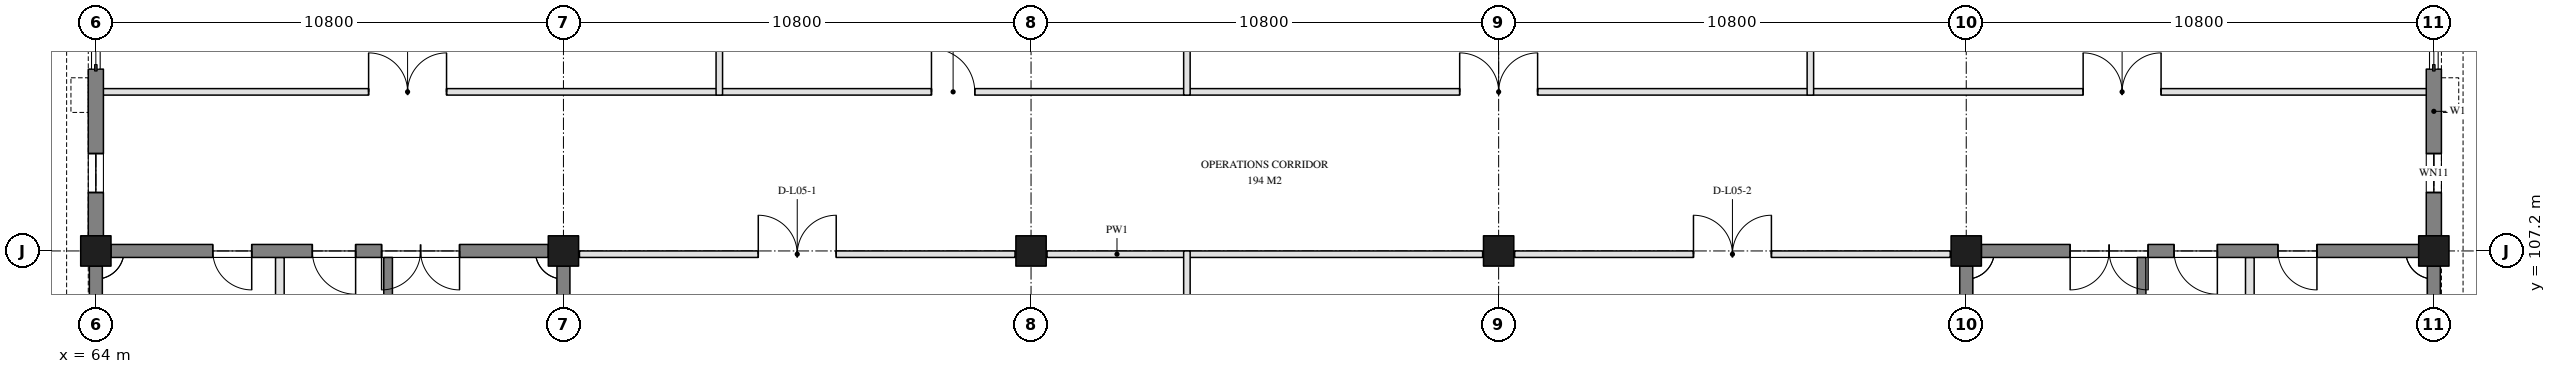
"""IFC4 building model, lengths in metres.
Left out: names, types, materials, properties, quantities, classifications, styles, units other than length and angle.
Written with IfcOpenShell. Run it as: python <this file> out.ifc"""

import sys

from ifc_helpers import new_model, si_unit, direction, frame, frame_2d, origin, origin_2d, place, context, subcontext, project, spatial, rectangle, extrude, element, fill, save


model = new_model("IFC4")
c1 = context("Model", 3, precision=1e-05, world=origin(), true_north=direction((0.0, 1.0)))
c2 = subcontext(c1, "Body", "Model", "MODEL_VIEW")
j1 = project(units=[si_unit("LENGTHUNIT", "METRE"), si_unit("PLANEANGLEUNIT", "RADIAN")], contexts=[c1])
p1 = place(None, origin())
s1 = spatial("IfcSite", under=j1, at=p1, CompositionType="ELEMENT")
p2 = place(p1, origin())
s2 = spatial("IfcBuilding", under=s1, at=p2, CompositionType="ELEMENT")
p3 = place(p2, frame((0.0, 0.0, 20.4)))
s3 = spatial("IfcBuildingStorey", under=s2, at=p3, CompositionType="ELEMENT", Elevation=20.4)
for number, where, z_axis, x_axis in (
    (1, (64.0, 107.2, 0.0), (0.0, 0.0, 1.0), (1.0, 0.0, 0.0)),
    (2, (74.8, 107.2, 0.0), (0.0, 0.0, 1.0), (1.0, 0.0, 0.0)),
    (3, (85.6, 107.2, 0.0), (0.0, 0.0, 1.0), (1.0, 0.0, 0.0)),
    (4, (96.4, 107.2, 0.0), (0.0, 0.0, 1.0), (1.0, 0.0, 0.0)),
    (5, (107.2, 107.2, 0.0), (0.0, 0.0, 1.0), (1.0, 0.0, 0.0)),
    (6, (118.0, 107.2, 0.0), (0.0, 0.0, 1.0), (1.0, 0.0, 0.0)),
):
    element("IfcColumn", number, at=place(p3, frame(where, z_axis=z_axis, x_axis=x_axis)), inside=s3, PredefinedType="COLUMN", context=c2, shape_type="SweptSolid", body=[
        extrude(rectangle(XDim=0.7, YDim=0.7, at=origin_2d()), origin(), (0.0, 0.0, 1.0), 3.9),
    ])
p4 = place(p3, frame((74.8, 96.75, 0.0), z_axis=(0.0, 0.0, 1.0), x_axis=(0.0, 1.0, 0.0)))
e7 = element("IfcWall", 7, at=p4, inside=s3, PredefinedType="SOLIDWALL", context=c2, shape_type="SweptSolid", body=[
    extrude(rectangle(XDim=10.1, YDim=0.3, at=frame_2d((5.05, 0.0))), origin(), (0.0, 0.0, 1.0), 3.9),
])
p5 = place(p3, frame((74.45, 107.2, 0.0), z_axis=(0.0, 0.0, 1.0), x_axis=(-1.0, 0.0, 0.0)))
e8 = element("IfcWall", 8, at=p5, inside=s3, PredefinedType="SOLIDWALL", context=c2, shape_type="SweptSolid", body=[
    extrude(rectangle(XDim=10.1, YDim=0.3, at=frame_2d((5.05, 0.0))), origin(), (0.0, 0.0, 1.0), 3.9),
])
p6 = place(p5, frame((2.05, 0.0, 0.0)))
e9 = element("IfcOpeningElement", 9, at=p6, cuts=e8, PredefinedType="OPENING", context=c2, shape_type="SweptSolid", body=[
    extrude(rectangle(XDim=1.8, YDim=2.1, at=frame_2d((0.9, 1.05))), frame((0.0, 0.16, 0.0), z_axis=(0.0, -1.0, 0.0), x_axis=(1.0, 0.0, 0.0)), (0.0, 0.0, 1.0), 0.32),
])
p7 = place(p5, frame((4.45, 0.0, 0.0)))
e10 = element("IfcOpeningElement", 10, at=p7, cuts=e8, PredefinedType="OPENING", context=c2, shape_type="SweptSolid", body=[
    extrude(rectangle(XDim=1.0, YDim=2.1, at=frame_2d((0.5, 1.05))), frame((0.0, 0.16, 0.0), z_axis=(0.0, -1.0, 0.0), x_axis=(1.0, 0.0, 0.0)), (0.0, 0.0, 1.0), 0.32),
])
p8 = place(p5, frame((6.85, 0.0, 0.0)))
e11 = element("IfcOpeningElement", 11, at=p8, cuts=e8, PredefinedType="OPENING", context=c2, shape_type="SweptSolid", body=[
    extrude(rectangle(XDim=0.9, YDim=2.1, at=frame_2d((0.45, 1.05))), frame((0.0, 0.16, 0.0), z_axis=(0.0, -1.0, 0.0), x_axis=(1.0, 0.0, 0.0)), (0.0, 0.0, 1.0), 0.32),
])
for number, where, z_axis, x_axis in (
    (12, (64.0, 106.85, 0.0), (0.0, 0.0, 1.0), (0.0, -1.0, 0.0)),
    (13, (118.0, 96.75, 0.0), (0.0, 0.0, 1.0), (0.0, 1.0, 0.0)),
):
    element("IfcWall", number, at=place(p3, frame(where, z_axis=z_axis, x_axis=x_axis)), inside=s3, PredefinedType="SOLIDWALL", context=c2, shape_type="SweptSolid", body=[
        extrude(rectangle(XDim=10.1, YDim=0.3, at=frame_2d((5.05, 0.0))), origin(), (0.0, 0.0, 1.0), 3.9),
    ])
p9 = place(p3, frame((117.65, 107.2, 0.0), z_axis=(0.0, 0.0, 1.0), x_axis=(-1.0, 0.0, 0.0)))
e14 = element("IfcWall", 14, at=p9, inside=s3, PredefinedType="SOLIDWALL", context=c2, shape_type="SweptSolid", body=[
    extrude(rectangle(XDim=10.1, YDim=0.3, at=frame_2d((5.05, 0.0))), origin(), (0.0, 0.0, 1.0), 3.9),
])
p10 = place(p9, frame((6.25, 0.0, 0.0)))
e15 = element("IfcOpeningElement", 15, at=p10, cuts=e14, PredefinedType="OPENING", context=c2, shape_type="SweptSolid", body=[
    extrude(rectangle(XDim=1.8, YDim=2.1, at=frame_2d((0.9, 1.05))), frame((0.0, 0.16, 0.0), z_axis=(0.0, -1.0, 0.0), x_axis=(1.0, 0.0, 0.0)), (0.0, 0.0, 1.0), 0.32),
])
p11 = place(p9, frame((4.65, 0.0, 0.0)))
e16 = element("IfcOpeningElement", 16, at=p11, cuts=e14, PredefinedType="OPENING", context=c2, shape_type="SweptSolid", body=[
    extrude(rectangle(XDim=1.0, YDim=2.1, at=frame_2d((0.5, 1.05))), frame((0.0, 0.16, 0.0), z_axis=(0.0, -1.0, 0.0), x_axis=(1.0, 0.0, 0.0)), (0.0, 0.0, 1.0), 0.32),
])
p12 = place(p9, frame((2.35, 0.0, 0.0)))
e17 = element("IfcOpeningElement", 17, at=p12, cuts=e14, PredefinedType="OPENING", context=c2, shape_type="SweptSolid", body=[
    extrude(rectangle(XDim=0.9, YDim=2.1, at=frame_2d((0.45, 1.05))), frame((0.0, 0.16, 0.0), z_axis=(0.0, -1.0, 0.0), x_axis=(1.0, 0.0, 0.0)), (0.0, 0.0, 1.0), 0.32),
])
p13 = place(p3, frame((107.2, 106.85, 0.0), z_axis=(0.0, 0.0, 1.0), x_axis=(0.0, -1.0, 0.0)))
e18 = element("IfcWall", 18, at=p13, inside=s3, PredefinedType="SOLIDWALL", context=c2, shape_type="SweptSolid", body=[
    extrude(rectangle(XDim=10.1, YDim=0.3, at=frame_2d((5.05, 0.0))), origin(), (0.0, 0.0, 1.0), 3.9),
])
p14 = place(p3, frame((64.0, 107.55, 0.0), z_axis=(0.0, 0.0, 1.0), x_axis=(0.0, 1.0, 0.0)))
e19 = element("IfcWall", 19, at=p14, inside=s3, PredefinedType="SOLIDWALL", context=c2, shape_type="SweptSolid", body=[
    extrude(rectangle(XDim=3.85, YDim=0.35, at=frame_2d((1.925, 0.0))), origin(), (0.0, 0.0, 1.0), 2.8),
])
p15 = place(p14, frame((1.0, 0.0, 0.9)))
e20 = element("IfcOpeningElement", 20, at=p15, cuts=e19, PredefinedType="OPENING", context=c2, shape_type="SweptSolid", body=[
    extrude(rectangle(XDim=0.9, YDim=1.8, at=frame_2d((0.45, 0.9))), frame((0.0, 0.185, 0.0), z_axis=(0.0, -1.0, 0.0), x_axis=(1.0, 0.0, 0.0)), (0.0, 0.0, 1.0), 0.37),
])
p16 = place(p3, frame((118.0, 107.55, 0.0), z_axis=(0.0, 0.0, 1.0), x_axis=(0.0, 1.0, 0.0)))
e21 = element("IfcWall", 21, at=p16, inside=s3, PredefinedType="SOLIDWALL", context=c2, shape_type="SweptSolid", body=[
    extrude(rectangle(XDim=3.85, YDim=0.35, at=frame_2d((1.925, 0.0))), origin(), (0.0, 0.0, 1.0), 2.8),
])
p17 = place(p16, frame((1.0, 0.0, 0.9)))
e22 = element("IfcOpeningElement", 22, at=p17, cuts=e21, PredefinedType="OPENING", context=c2, shape_type="SweptSolid", body=[
    extrude(rectangle(XDim=0.9, YDim=1.8, at=frame_2d((0.45, 0.9))), frame((0.0, 0.185, 0.0), z_axis=(0.0, -1.0, 0.0), x_axis=(1.0, 0.0, 0.0)), (0.0, 0.0, 1.0), 0.37),
])
p18 = place(p3, frame((70.75, 104.8, 0.0), z_axis=(0.0, 0.0, 1.0), x_axis=(0.0, 1.0, 0.0)))
e23 = element("IfcWall", 23, at=p18, inside=s3, PredefinedType="SOLIDWALL", context=c2, shape_type="SweptSolid", body=[
    extrude(rectangle(XDim=2.25, YDim=0.2, at=frame_2d((1.125, 0.0))), origin(), (0.0, 0.0, 1.0), 3.6),
])
p19 = place(p3, frame((68.25, 104.8, 0.0), z_axis=(0.0, 0.0, 1.0), x_axis=(0.0, 1.0, 0.0)))
e24 = element("IfcWall", 24, at=p19, inside=s3, PredefinedType="PARTITIONING", context=c2, shape_type="SweptSolid", body=[
    extrude(rectangle(XDim=2.25, YDim=0.2, at=frame_2d((1.125, 0.0))), origin(), (0.0, 0.0, 1.0), 3.6),
])
p20 = place(p3, frame((111.25, 107.05, 0.0), z_axis=(0.0, 0.0, 1.0), x_axis=(0.0, -1.0, 0.0)))
e25 = element("IfcWall", 25, at=p20, inside=s3, PredefinedType="SOLIDWALL", context=c2, shape_type="SweptSolid", body=[
    extrude(rectangle(XDim=2.25, YDim=0.2, at=frame_2d((1.125, 0.0))), origin(), (0.0, 0.0, 1.0), 3.6),
])
p21 = place(p3, frame((113.75, 107.05, 0.0), z_axis=(0.0, 0.0, 1.0), x_axis=(0.0, -1.0, 0.0)))
e26 = element("IfcWall", 26, at=p21, inside=s3, PredefinedType="PARTITIONING", context=c2, shape_type="SweptSolid", body=[
    extrude(rectangle(XDim=2.25, YDim=0.2, at=frame_2d((1.125, 0.0))), origin(), (0.0, 0.0, 1.0), 3.6),
])
p22 = place(p3, frame((85.97, 107.125, 0.0), z_axis=(0.0, 0.0, 1.0), x_axis=(1.0, 0.0, 0.0)))
e27 = element("IfcWall", 27, at=p22, inside=s3, PredefinedType="PARTITIONING", context=c2, shape_type="SweptSolid", body=[
    extrude(rectangle(XDim=3.23, YDim=0.15, at=frame_2d((1.615, 0.0))), origin(), (0.0, 0.0, 1.0), 2.8),
])
p23 = place(p3, frame((75.17, 107.125, 0.0), z_axis=(0.0, 0.0, 1.0), x_axis=(1.0, 0.0, 0.0)))
e28 = element("IfcWall", 28, at=p23, inside=s3, PredefinedType="PARTITIONING", context=c2, shape_type="SweptSolid", body=[
    extrude(rectangle(XDim=10.06, YDim=0.15, at=frame_2d((5.03, 0.0))), origin(), (0.0, 0.0, 1.0), 2.8),
])
p24 = place(p23, frame((4.13, 0.0, 0.0)))
e29 = element("IfcOpeningElement", 29, at=p24, cuts=e28, PredefinedType="OPENING", context=c2, shape_type="SweptSolid", body=[
    extrude(rectangle(XDim=1.8, YDim=2.1, at=frame_2d((0.9, 1.05))), frame((0.0, 0.085, 0.0), z_axis=(0.0, -1.0, 0.0), x_axis=(1.0, 0.0, 0.0)), (0.0, 0.0, 1.0), 0.17),
])
p25 = place(p3, frame((96.77, 107.125, 0.0), z_axis=(0.0, 0.0, 1.0), x_axis=(1.0, 0.0, 0.0)))
e30 = element("IfcWall", 30, at=p25, inside=s3, PredefinedType="PARTITIONING", context=c2, shape_type="SweptSolid", body=[
    extrude(rectangle(XDim=10.06, YDim=0.15, at=frame_2d((5.03, 0.0))), origin(), (0.0, 0.0, 1.0), 2.8),
])
p26 = place(p25, frame((4.13, 0.0, 0.0)))
e31 = element("IfcOpeningElement", 31, at=p26, cuts=e30, PredefinedType="OPENING", context=c2, shape_type="SweptSolid", body=[
    extrude(rectangle(XDim=1.8, YDim=2.1, at=frame_2d((0.9, 1.05))), frame((0.0, 0.085, 0.0), z_axis=(0.0, -1.0, 0.0), x_axis=(1.0, 0.0, 0.0)), (0.0, 0.0, 1.0), 0.17),
])
p27 = place(p3, frame((89.2, 107.125, 0.0), z_axis=(0.0, 0.0, 1.0), x_axis=(1.0, 0.0, 0.0)))
e32 = element("IfcWall", 32, at=p27, inside=s3, PredefinedType="PARTITIONING", context=c2, shape_type="SweptSolid", body=[
    extrude(rectangle(XDim=6.83, YDim=0.15, at=frame_2d((3.415, 0.0))), origin(), (0.0, 0.0, 1.0), 2.8),
])
p28 = place(p3, frame((64.0, 110.875, 0.0), z_axis=(0.0, 0.0, 1.0), x_axis=(1.0, 0.0, 0.0)))
e33 = element("IfcWall", 33, at=p28, inside=s3, PredefinedType="PARTITIONING", context=c2, shape_type="SweptSolid", body=[
    extrude(rectangle(XDim=14.4, YDim=0.15, at=frame_2d((7.2, 0.0))), origin(), (0.0, 0.0, 1.0), 2.8),
])
p29 = place(p28, frame((6.3, 0.0, 0.0)))
e34 = element("IfcOpeningElement", 34, at=p29, cuts=e33, PredefinedType="OPENING", context=c2, shape_type="SweptSolid", body=[
    extrude(rectangle(XDim=1.8, YDim=2.1, at=frame_2d((0.9, 1.05))), frame((0.0, 0.085, 0.0), z_axis=(0.0, -1.0, 0.0), x_axis=(1.0, 0.0, 0.0)), (0.0, 0.0, 1.0), 0.17),
])
p30 = place(p3, frame((78.4, 110.875, 0.0), z_axis=(0.0, 0.0, 1.0), x_axis=(1.0, 0.0, 0.0)))
e35 = element("IfcWall", 35, at=p30, inside=s3, PredefinedType="PARTITIONING", context=c2, shape_type="SweptSolid", body=[
    extrude(rectangle(XDim=10.8, YDim=0.15, at=frame_2d((5.4, 0.0))), origin(), (0.0, 0.0, 1.0), 2.8),
])
p31 = place(p30, frame((4.9, 0.0, 0.0)))
e36 = element("IfcOpeningElement", 36, at=p31, cuts=e35, PredefinedType="OPENING", context=c2, shape_type="SweptSolid", body=[
    extrude(rectangle(XDim=1.0, YDim=2.1, at=frame_2d((0.5, 1.05))), frame((0.0, 0.085, 0.0), z_axis=(0.0, -1.0, 0.0), x_axis=(1.0, 0.0, 0.0)), (0.0, 0.0, 1.0), 0.17),
])
p32 = place(p3, frame((89.2, 110.875, 0.0), z_axis=(0.0, 0.0, 1.0), x_axis=(1.0, 0.0, 0.0)))
e37 = element("IfcWall", 37, at=p32, inside=s3, PredefinedType="PARTITIONING", context=c2, shape_type="SweptSolid", body=[
    extrude(rectangle(XDim=14.4, YDim=0.15, at=frame_2d((7.2, 0.0))), origin(), (0.0, 0.0, 1.0), 2.8),
])
p33 = place(p32, frame((6.3, 0.0, 0.0)))
e38 = element("IfcOpeningElement", 38, at=p33, cuts=e37, PredefinedType="OPENING", context=c2, shape_type="SweptSolid", body=[
    extrude(rectangle(XDim=1.8, YDim=2.1, at=frame_2d((0.9, 1.05))), frame((0.0, 0.085, 0.0), z_axis=(0.0, -1.0, 0.0), x_axis=(1.0, 0.0, 0.0)), (0.0, 0.0, 1.0), 0.17),
])
p34 = place(p3, frame((103.6, 110.875, 0.0), z_axis=(0.0, 0.0, 1.0), x_axis=(1.0, 0.0, 0.0)))
e39 = element("IfcWall", 39, at=p34, inside=s3, PredefinedType="PARTITIONING", context=c2, shape_type="SweptSolid", body=[
    extrude(rectangle(XDim=14.4, YDim=0.15, at=frame_2d((7.2, 0.0))), origin(), (0.0, 0.0, 1.0), 2.8),
])
p35 = place(p34, frame((6.3, 0.0, 0.0)))
e40 = element("IfcOpeningElement", 40, at=p35, cuts=e39, PredefinedType="OPENING", context=c2, shape_type="SweptSolid", body=[
    extrude(rectangle(XDim=1.8, YDim=2.1, at=frame_2d((0.9, 1.05))), frame((0.0, 0.085, 0.0), z_axis=(0.0, -1.0, 0.0), x_axis=(1.0, 0.0, 0.0)), (0.0, 0.0, 1.0), 0.17),
])
p36 = place(p3, frame((89.2, 96.4, 0.0), z_axis=(0.0, 0.0, 1.0), x_axis=(0.0, 1.0, 0.0)))
e41 = element("IfcWall", 41, at=p36, inside=s3, PredefinedType="PARTITIONING", context=c2, shape_type="SweptSolid", body=[
    extrude(rectangle(XDim=10.8, YDim=0.15, at=frame_2d((5.4, 0.0))), origin(), (0.0, 0.0, 1.0), 2.8),
])
for number, where, z_axis, x_axis in (
    (42, (78.4, 110.8, 0.0), (0.0, 0.0, 1.0), (0.0, 1.0, 0.0)),
    (43, (89.2, 110.8, 0.0), (0.0, 0.0, 1.0), (0.0, 1.0, 0.0)),
    (44, (103.6, 110.8, 0.0), (0.0, 0.0, 1.0), (0.0, 1.0, 0.0)),
):
    element("IfcWall", number, at=place(p3, frame(where, z_axis=z_axis, x_axis=x_axis)), inside=s3, PredefinedType="PARTITIONING", context=c2, shape_type="SweptSolid", body=[
        extrude(rectangle(XDim=7.2, YDim=0.15, at=frame_2d((3.6, 0.0))), origin(), (0.0, 0.0, 1.0), 2.8),
    ])
p37 = place(p15, origin())
e45 = element("IfcWindow", 45, at=p37, inside=s3, PartitioningType="SINGLE_PANEL", PredefinedType="WINDOW", context=c2, shape_type="SweptSolid", body=[
    extrude(rectangle(XDim=0.9, YDim=1.8, at=frame_2d((0.45, 0.9))), frame((0.0, 0.03, 0.0), z_axis=(0.0, -1.0, 0.0), x_axis=(1.0, 0.0, 0.0)), (0.0, 0.0, 1.0), 0.06),
])
fill(e20, e45)
p38 = place(p17, origin())
e46 = element("IfcWindow", 46, at=p38, inside=s3, PartitioningType="SINGLE_PANEL", PredefinedType="WINDOW", context=c2, shape_type="SweptSolid", body=[
    extrude(rectangle(XDim=0.9, YDim=1.8, at=frame_2d((0.45, 0.9))), frame((0.0, 0.03, 0.0), z_axis=(0.0, -1.0, 0.0), x_axis=(1.0, 0.0, 0.0)), (0.0, 0.0, 1.0), 0.06),
])
fill(e22, e46)
p39 = place(p6, frame((1.8, 0.0, 0.0), z_axis=(0.0, 0.0, 1.0), x_axis=(-1.0, 0.0, 0.0)))
e47 = element("IfcDoor", 47, at=p39, inside=s3, OperationType="DOUBLE_DOOR_DOUBLE_SWING", PredefinedType="DOOR", context=c2, shape_type="SweptSolid", body=[
    extrude(rectangle(XDim=1.8, YDim=2.1, at=frame_2d((0.9, 1.05))), frame((0.0, 0.025, 0.0), z_axis=(0.0, -1.0, 0.0), x_axis=(1.0, 0.0, 0.0)), (0.0, 0.0, 1.0), 0.05),
])
fill(e9, e47)
p40 = place(p7, origin())
e48 = element("IfcDoor", 48, at=p40, inside=s3, OperationType="SINGLE_SWING_LEFT", PredefinedType="DOOR", context=c2, shape_type="SweptSolid", body=[
    extrude(rectangle(XDim=1.0, YDim=2.1, at=frame_2d((0.5, 1.05))), frame((0.0, 0.025, 0.0), z_axis=(0.0, -1.0, 0.0), x_axis=(1.0, 0.0, 0.0)), (0.0, 0.0, 1.0), 0.05),
])
fill(e10, e48)
p41 = place(p8, origin())
e49 = element("IfcDoor", 49, at=p41, inside=s3, OperationType="SINGLE_SWING_RIGHT", PredefinedType="DOOR", context=c2, shape_type="SweptSolid", body=[
    extrude(rectangle(XDim=0.9, YDim=2.1, at=frame_2d((0.45, 1.05))), frame((0.0, 0.025, 0.0), z_axis=(0.0, -1.0, 0.0), x_axis=(1.0, 0.0, 0.0)), (0.0, 0.0, 1.0), 0.05),
])
fill(e11, e49)
p42 = place(p10, frame((1.8, 0.0, 0.0), z_axis=(0.0, 0.0, 1.0), x_axis=(-1.0, 0.0, 0.0)))
e50 = element("IfcDoor", 50, at=p42, inside=s3, OperationType="DOUBLE_DOOR_DOUBLE_SWING", PredefinedType="DOOR", context=c2, shape_type="SweptSolid", body=[
    extrude(rectangle(XDim=1.8, YDim=2.1, at=frame_2d((0.9, 1.05))), frame((0.0, 0.025, 0.0), z_axis=(0.0, -1.0, 0.0), x_axis=(1.0, 0.0, 0.0)), (0.0, 0.0, 1.0), 0.05),
])
fill(e15, e50)
p43 = place(p11, origin())
e51 = element("IfcDoor", 51, at=p43, inside=s3, OperationType="SINGLE_SWING_RIGHT", PredefinedType="DOOR", context=c2, shape_type="SweptSolid", body=[
    extrude(rectangle(XDim=1.0, YDim=2.1, at=frame_2d((0.5, 1.05))), frame((0.0, 0.025, 0.0), z_axis=(0.0, -1.0, 0.0), x_axis=(1.0, 0.0, 0.0)), (0.0, 0.0, 1.0), 0.05),
])
fill(e16, e51)
p44 = place(p12, origin())
e52 = element("IfcDoor", 52, at=p44, inside=s3, OperationType="SINGLE_SWING_LEFT", PredefinedType="DOOR", context=c2, shape_type="SweptSolid", body=[
    extrude(rectangle(XDim=0.9, YDim=2.1, at=frame_2d((0.45, 1.05))), frame((0.0, 0.025, 0.0), z_axis=(0.0, -1.0, 0.0), x_axis=(1.0, 0.0, 0.0)), (0.0, 0.0, 1.0), 0.05),
])
fill(e17, e52)
p45 = place(p24, origin())
e53 = element("IfcDoor", 53, at=p45, inside=s3, OperationType="DOUBLE_DOOR_DOUBLE_SWING", PredefinedType="DOOR", context=c2, shape_type="SweptSolid", body=[
    extrude(rectangle(XDim=1.8, YDim=2.1, at=frame_2d((0.9, 1.05))), frame((0.0, 0.025, 0.0), z_axis=(0.0, -1.0, 0.0), x_axis=(1.0, 0.0, 0.0)), (0.0, 0.0, 1.0), 0.05),
])
fill(e29, e53)
p46 = place(p26, origin())
e54 = element("IfcDoor", 54, at=p46, inside=s3, OperationType="DOUBLE_DOOR_DOUBLE_SWING", PredefinedType="DOOR", context=c2, shape_type="SweptSolid", body=[
    extrude(rectangle(XDim=1.8, YDim=2.1, at=frame_2d((0.9, 1.05))), frame((0.0, 0.025, 0.0), z_axis=(0.0, -1.0, 0.0), x_axis=(1.0, 0.0, 0.0)), (0.0, 0.0, 1.0), 0.05),
])
fill(e31, e54)
p47 = place(p29, origin())
e55 = element("IfcDoor", 55, at=p47, inside=s3, OperationType="DOUBLE_DOOR_DOUBLE_SWING", PredefinedType="DOOR", context=c2, shape_type="SweptSolid", body=[
    extrude(rectangle(XDim=1.8, YDim=2.1, at=frame_2d((0.9, 1.05))), frame((0.0, 0.025, 0.0), z_axis=(0.0, -1.0, 0.0), x_axis=(1.0, 0.0, 0.0)), (0.0, 0.0, 1.0), 0.05),
])
fill(e34, e55)
p48 = place(p31, origin())
e56 = element("IfcDoor", 56, at=p48, inside=s3, OperationType="SINGLE_SWING_RIGHT", PredefinedType="DOOR", context=c2, shape_type="SweptSolid", body=[
    extrude(rectangle(XDim=1.0, YDim=2.1, at=frame_2d((0.5, 1.05))), frame((0.0, 0.025, 0.0), z_axis=(0.0, -1.0, 0.0), x_axis=(1.0, 0.0, 0.0)), (0.0, 0.0, 1.0), 0.05),
])
fill(e36, e56)
p49 = place(p33, frame((1.8, 0.0, 0.0), z_axis=(0.0, 0.0, 1.0), x_axis=(-1.0, 0.0, 0.0)))
e57 = element("IfcDoor", 57, at=p49, inside=s3, OperationType="DOUBLE_DOOR_DOUBLE_SWING", PredefinedType="DOOR", context=c2, shape_type="SweptSolid", body=[
    extrude(rectangle(XDim=1.8, YDim=2.1, at=frame_2d((0.9, 1.05))), frame((0.0, 0.025, 0.0), z_axis=(0.0, -1.0, 0.0), x_axis=(1.0, 0.0, 0.0)), (0.0, 0.0, 1.0), 0.05),
])
fill(e38, e57)
p50 = place(p35, origin())
e58 = element("IfcDoor", 58, at=p50, inside=s3, OperationType="DOUBLE_DOOR_DOUBLE_SWING", PredefinedType="DOOR", context=c2, shape_type="SweptSolid", body=[
    extrude(rectangle(XDim=1.8, YDim=2.1, at=frame_2d((0.9, 1.05))), frame((0.0, 0.025, 0.0), z_axis=(0.0, -1.0, 0.0), x_axis=(1.0, 0.0, 0.0)), (0.0, 0.0, 1.0), 0.05),
])
fill(e40, e58)
save(model, sys.argv[1])
